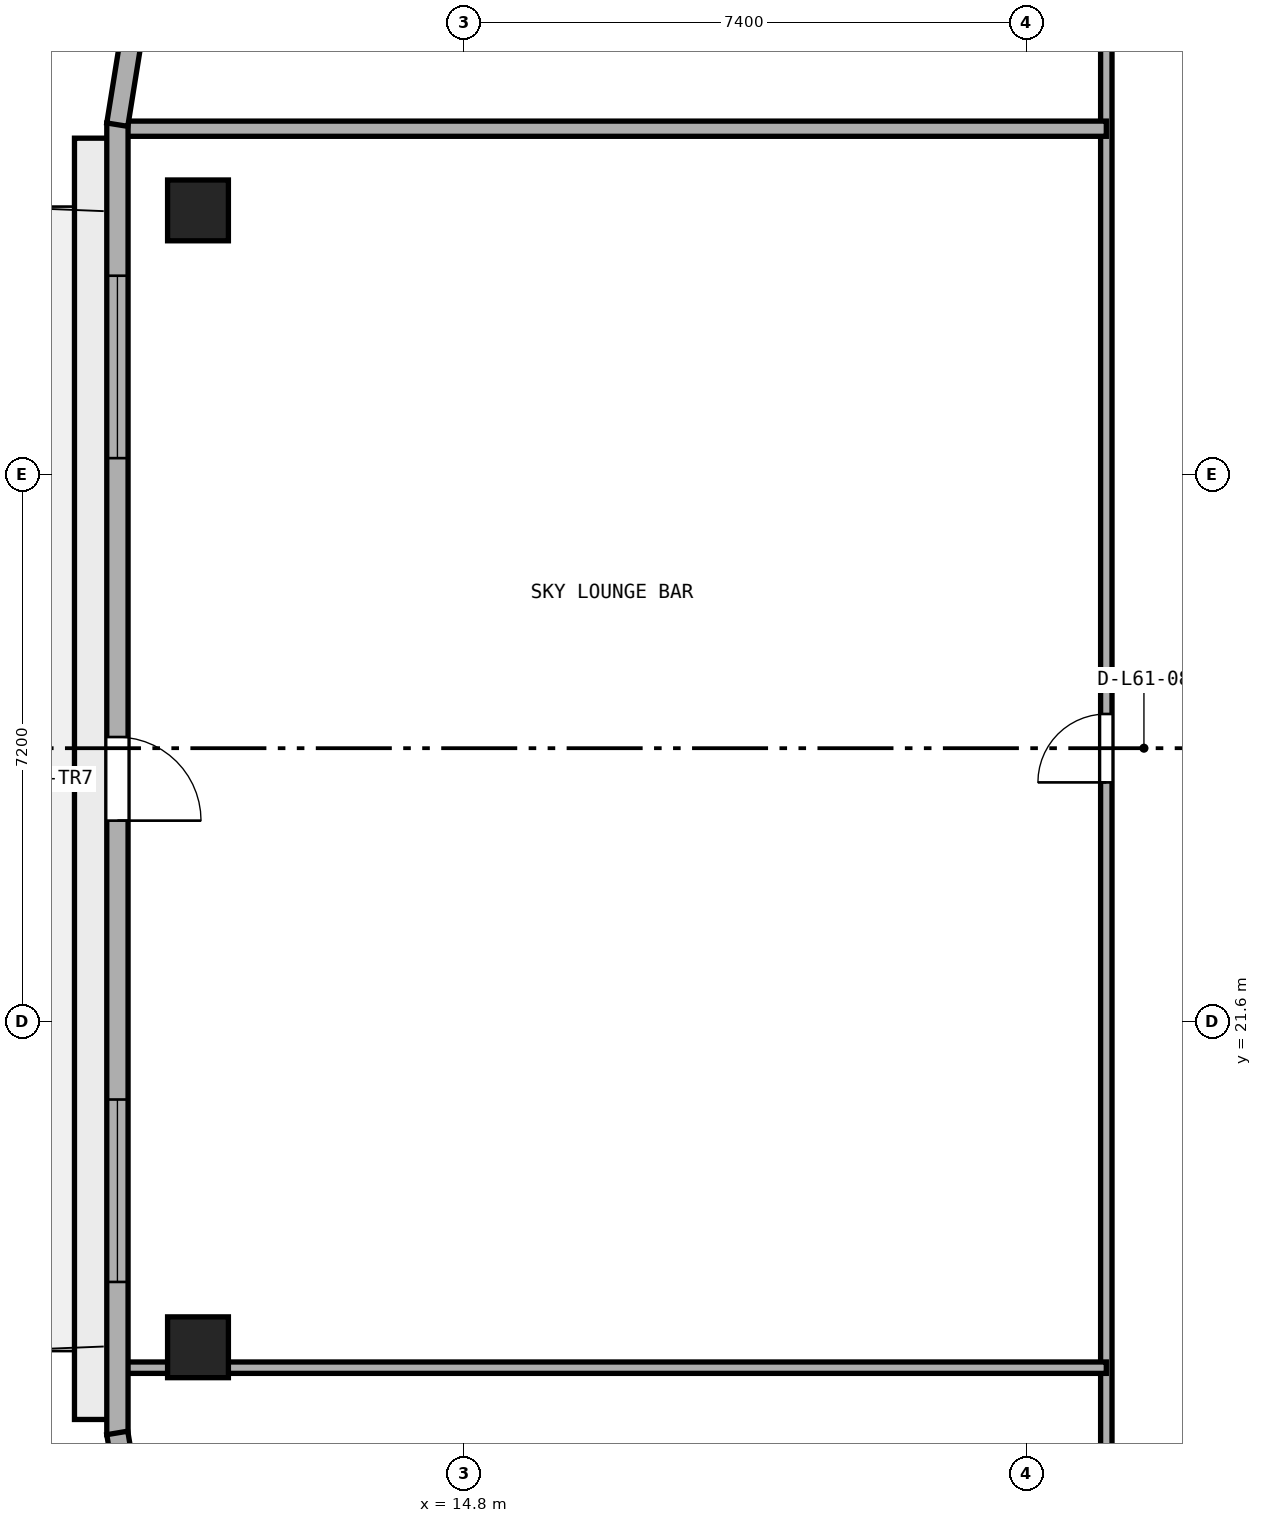
"""IFC4 building model, lengths in metres.
Left out: names, types, materials, properties, quantities, classifications, styles, units other than length and angle.
Written with IfcOpenShell. Run it as: python <this file> out.ifc"""

import sys

from ifc_helpers import new_model, si_unit, direction, frame, frame_2d, origin, origin_2d, place, context, subcontext, project, spatial, rectangle, extrude, element, fill, save


model = new_model("IFC4")
c1 = context("Model", 3, precision=1e-05, world=origin(), true_north=direction((0.0, 1.0)))
c2 = subcontext(c1, "Body", "Model", "MODEL_VIEW")
j1 = project(units=[si_unit("LENGTHUNIT", "METRE"), si_unit("PLANEANGLEUNIT", "RADIAN")], contexts=[c1])
p1 = place(None, origin())
s1 = spatial("IfcSite", under=j1, at=p1, CompositionType="ELEMENT")
p2 = place(p1, origin())
s2 = spatial("IfcBuilding", under=s1, at=p2, CompositionType="ELEMENT")
p3 = place(p2, frame((0.0, 0.0, 240.2)))
s3 = spatial("IfcBuildingStorey", under=s2, at=p3, CompositionType="ELEMENT", Elevation=240.2)
for number, where, z_axis, x_axis in (
    (1, (11.3, 32.275, 0.0), (0.0, 0.0, 1.0), (1.0, 0.0, 0.0)),
    (2, (11.3, 17.319, 0.0), (0.0, 0.0, 1.0), (1.0, 0.0, 0.0)),
):
    element("IfcColumn", number, at=place(p3, frame(where, z_axis=z_axis, x_axis=x_axis)), inside=s3, PredefinedType="COLUMN", context=c2, shape_type="SweptSolid", body=[
        extrude(rectangle(XDim=0.8, YDim=0.8, at=origin_2d()), origin(), (0.0, 0.0, 1.0), 3.8),
    ])
p4 = place(p3, frame((23.25, 14.85, 0.0), z_axis=(0.0, 0.0, 1.0), x_axis=(0.0, 1.0, 0.0)))
e3 = element("IfcWall", 3, at=p4, inside=s3, PredefinedType="PARTITIONING", context=c2, shape_type="SweptSolid", body=[
    extrude(rectangle(XDim=20.7, YDim=0.15, at=frame_2d((10.35, 0.0))), origin(), (0.0, 0.0, 1.0), 3.51),
])
p5 = place(p4, frame((9.9, 0.0, 0.0)))
e4 = element("IfcOpeningElement", 4, at=p5, cuts=e3, PredefinedType="OPENING", context=c2, shape_type="SweptSolid", body=[
    extrude(rectangle(XDim=0.9, YDim=2.1, at=frame_2d((0.45, 1.05))), frame((0.0, 0.085, 0.0), z_axis=(0.0, -1.0, 0.0), x_axis=(1.0, 0.0, 0.0)), (0.0, 0.0, 1.0), 0.17),
])
p6 = place(p3, frame((10.305, 17.05, 0.0), z_axis=(0.0, 0.0, 1.0), x_axis=(1.0, 0.0, 0.0)))
e5 = element("IfcWall", 5, at=p6, inside=s3, PredefinedType="PARTITIONING", context=c2, shape_type="SweptSolid", body=[
    extrude(rectangle(XDim=12.945, YDim=0.15, at=frame_2d((6.473, 0.0))), origin(), (0.0, 0.0, 1.0), 3.51),
])
p7 = place(p3, frame((10.305, 33.35, 0.0), z_axis=(0.0, 0.0, 1.0), x_axis=(1.0, 0.0, 0.0)))
e6 = element("IfcWall", 6, at=p7, inside=s3, PredefinedType="PARTITIONING", context=c2, shape_type="SweptSolid", body=[
    extrude(rectangle(XDim=12.945, YDim=0.2, at=frame_2d((6.473, 0.0))), origin(), (0.0, 0.0, 1.0), 3.51),
])
p8 = place(p3, frame((10.24, 33.425, 0.0), z_axis=(0.0, 0.0, 1.0), x_axis=(0.0, -1.0, 0.0)))
e7 = element("IfcWall", 7, at=p8, inside=s3, PredefinedType="STANDARD", context=c2, shape_type="SweptSolid", body=[
    extrude(rectangle(XDim=17.257, YDim=0.28, at=frame_2d((8.628, 0.0))), origin(), (0.0, 0.0, 1.0), 3.51),
])
p9 = place(p8, frame((8.078, 0.0, 0.0)))
e8 = element("IfcOpeningElement", 8, at=p9, cuts=e7, PredefinedType="OPENING", context=c2, shape_type="SweptSolid", body=[
    extrude(rectangle(XDim=1.1, YDim=2.2, at=frame_2d((0.55, 1.1))), frame((0.0, 0.15, 0.0), z_axis=(0.0, -1.0, 0.0), x_axis=(1.0, 0.0, 0.0)), (0.0, 0.0, 1.0), 0.3),
])
p10 = place(p8, frame((2.01, 0.0, 0.9)))
e9 = element("IfcOpeningElement", 9, at=p10, cuts=e7, PredefinedType="OPENING", context=c2, shape_type="SweptSolid", body=[
    extrude(rectangle(XDim=2.4, YDim=1.75, at=frame_2d((1.2, 0.875))), frame((0.0, 0.15, 0.0), z_axis=(0.0, -1.0, 0.0), x_axis=(1.0, 0.0, 0.0)), (0.0, 0.0, 1.0), 0.3),
])
p11 = place(p8, frame((12.847, 0.0, 0.9)))
e10 = element("IfcOpeningElement", 10, at=p11, cuts=e7, PredefinedType="OPENING", context=c2, shape_type="SweptSolid", body=[
    extrude(rectangle(XDim=2.4, YDim=1.75, at=frame_2d((1.2, 0.875))), frame((0.0, 0.15, 0.0), z_axis=(0.0, -1.0, 0.0), x_axis=(1.0, 0.0, 0.0)), (0.0, 0.0, 1.0), 0.3),
])
p12 = place(p3, frame((10.445, 34.688, 0.0), z_axis=(0.0, 0.0, 1.0), x_axis=(-0.158524605336, -0.987355027081, 0.0)))
e11 = element("IfcWall", 11, at=p12, inside=s3, PredefinedType="STANDARD", context=c2, shape_type="SweptSolid", body=[
    extrude(rectangle(XDim=1.301, YDim=0.28, at=frame_2d((0.651, 0.0))), origin(), (0.0, 0.0, 1.0), 3.51),
])
p13 = place(p3, frame((10.238, 16.192, 0.0), z_axis=(0.0, 0.0, 1.0), x_axis=(0.164604311367, -0.986359681191, 0.0)))
e12 = element("IfcWall", 12, at=p13, inside=s3, PredefinedType="STANDARD", context=c2, shape_type="SweptSolid", body=[
    extrude(rectangle(XDim=1.35, YDim=0.28, at=frame_2d((0.675, 0.0))), origin(), (0.0, 0.0, 1.0), 3.51),
])
p14 = place(p5, origin())
e13 = element("IfcDoor", 13, at=p14, inside=s3, OperationType="SINGLE_SWING_LEFT", PredefinedType="DOOR", context=c2, shape_type="SweptSolid", body=[
    extrude(rectangle(XDim=0.9, YDim=2.1, at=frame_2d((0.45, 1.05))), frame((0.0, 0.025, 0.0), z_axis=(0.0, -1.0, 0.0), x_axis=(1.0, 0.0, 0.0)), (0.0, 0.0, 1.0), 0.05),
])
fill(e4, e13)
p15 = place(p9, origin())
e14 = element("IfcDoor", 14, at=p15, inside=s3, OperationType="SINGLE_SWING_RIGHT", PredefinedType="DOOR", context=c2, shape_type="SweptSolid", body=[
    extrude(rectangle(XDim=1.1, YDim=2.2, at=frame_2d((0.55, 1.1))), frame((0.0, 0.025, 0.0), z_axis=(0.0, -1.0, 0.0), x_axis=(1.0, 0.0, 0.0)), (0.0, 0.0, 1.0), 0.05),
])
fill(e8, e14)
p16 = place(p10, origin())
e15 = element("IfcWindow", 15, at=p16, inside=s3, PartitioningType="SINGLE_PANEL", PredefinedType="WINDOW", context=c2, shape_type="SweptSolid", body=[
    extrude(rectangle(XDim=2.4, YDim=1.75, at=frame_2d((1.2, 0.875))), frame((0.0, 0.03, 0.0), z_axis=(0.0, -1.0, 0.0), x_axis=(1.0, 0.0, 0.0)), (0.0, 0.0, 1.0), 0.06),
])
fill(e9, e15)
p17 = place(p11, origin())
e16 = element("IfcWindow", 16, at=p17, inside=s3, PartitioningType="SINGLE_PANEL", PredefinedType="WINDOW", context=c2, shape_type="SweptSolid", body=[
    extrude(rectangle(XDim=2.4, YDim=1.75, at=frame_2d((1.2, 0.875))), frame((0.0, 0.03, 0.0), z_axis=(0.0, -1.0, 0.0), x_axis=(1.0, 0.0, 0.0)), (0.0, 0.0, 1.0), 0.06),
])
fill(e10, e16)
save(model, sys.argv[1])
